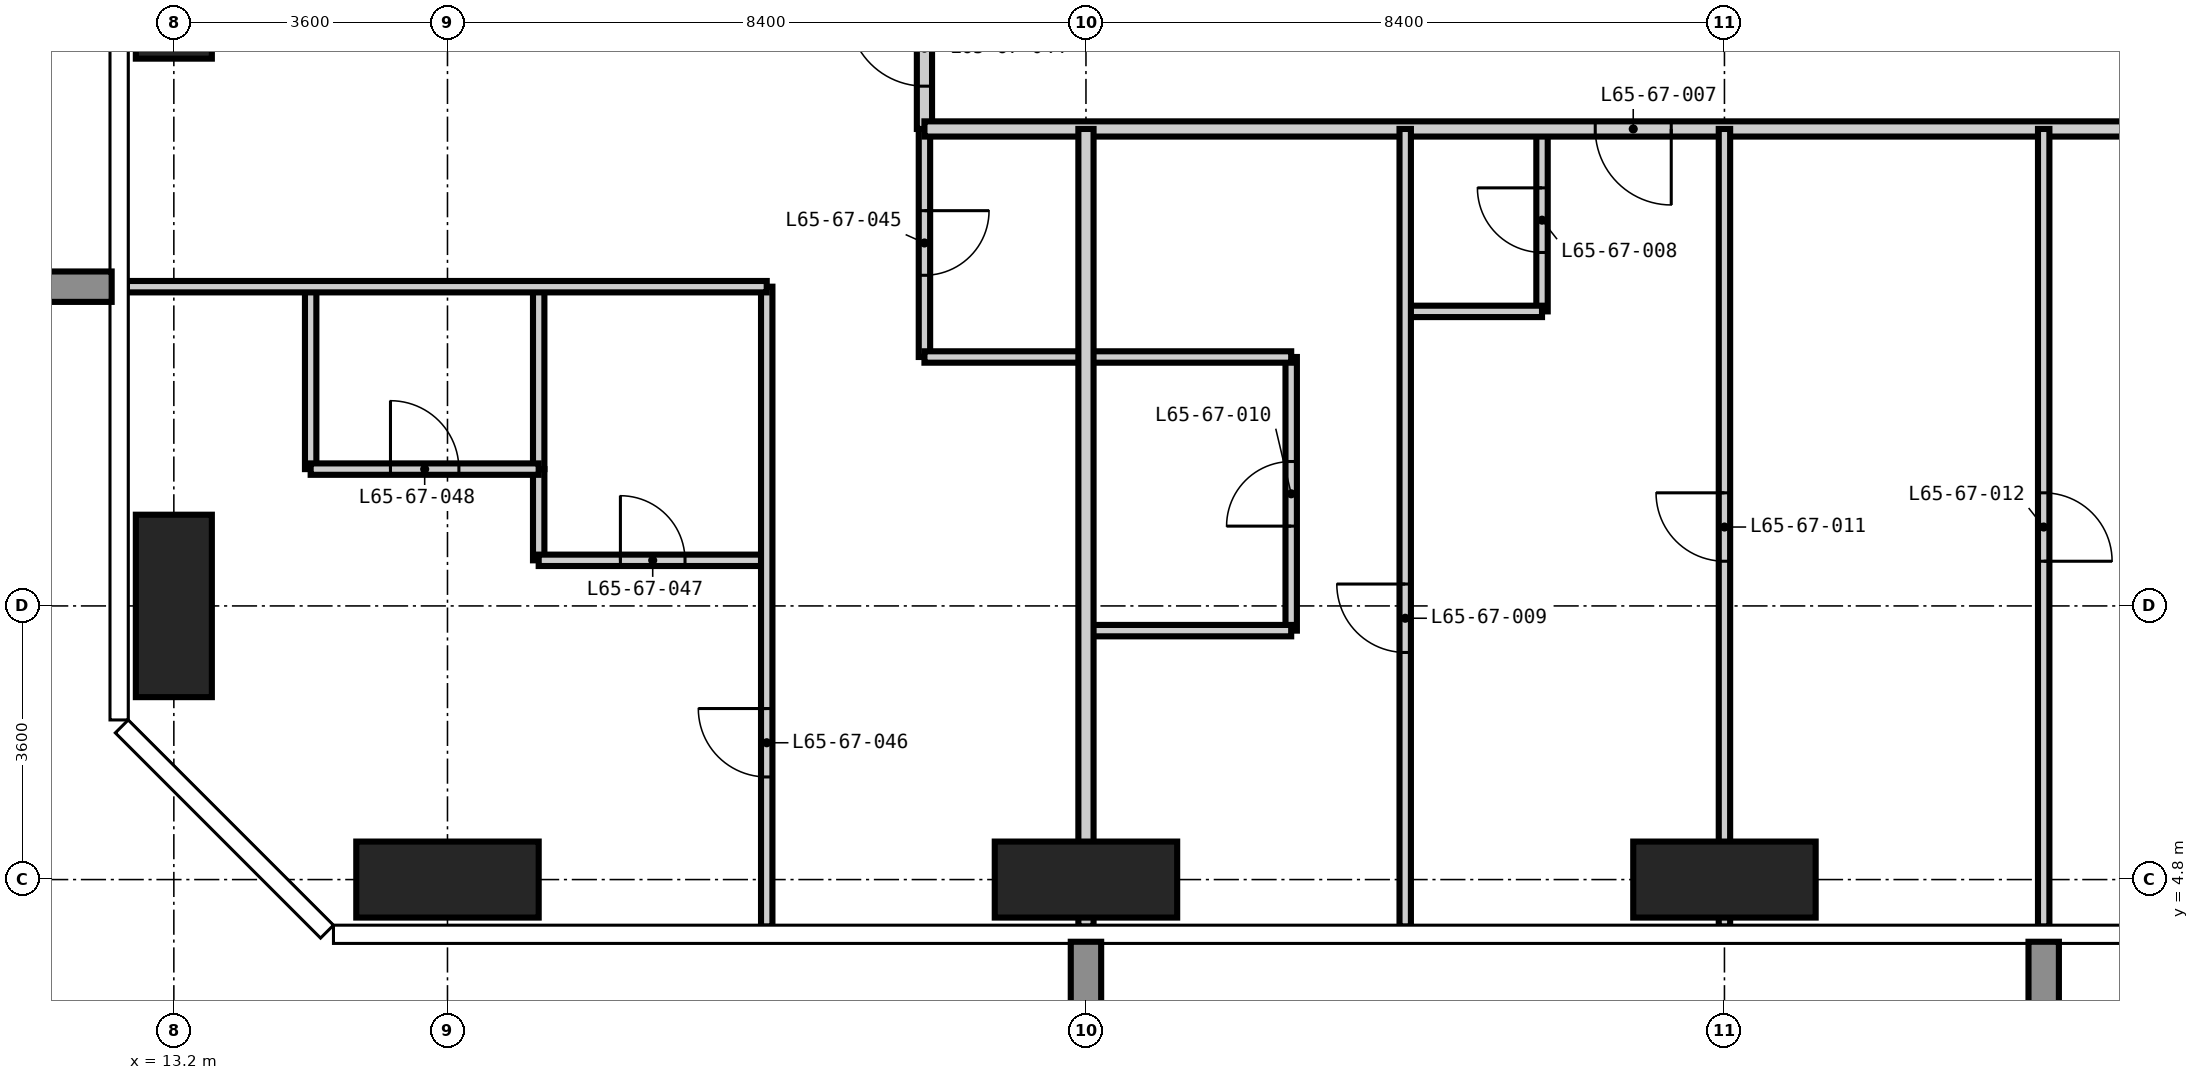
"""IFC4 building model, lengths in metres.
Left out: names, types, materials, properties, quantities, classifications, styles, units other than length and angle.
Written with IfcOpenShell. Run it as: python <this file> out.ifc"""

import sys

from ifc_helpers import new_model, si_unit, direction, frame, frame_2d, origin, origin_2d, place, context, subcontext, project, spatial, rectangle, extrude, element, fill, save


model = new_model("IFC4")
c1 = context("Model", 3, precision=1e-05, world=origin(), true_north=direction((0.0, 1.0)))
c2 = subcontext(c1, "Body", "Model", "MODEL_VIEW")
j1 = project(units=[si_unit("LENGTHUNIT", "METRE"), si_unit("PLANEANGLEUNIT", "RADIAN")], contexts=[c1])
p1 = place(None, origin())
s1 = spatial("IfcSite", under=j1, at=p1, CompositionType="ELEMENT")
p2 = place(p1, origin())
s2 = spatial("IfcBuilding", under=s1, at=p2, CompositionType="ELEMENT")
p3 = place(p2, frame((0.0, 0.0, 252.9)))
s3 = spatial("IfcBuildingStorey", under=s2, at=p3, CompositionType="ELEMENT", Elevation=252.9)
for number, where, z_axis, x_axis in (
    (1, (13.2, 8.4, -0.35), (0.0, 0.0, 1.0), (1.0, 0.0, 0.0)),
    (2, (13.2, 16.8, -0.35), (0.0, 0.0, 1.0), (1.0, 0.0, 0.0)),
):
    element("IfcColumn", number, at=place(p3, frame(where, z_axis=z_axis, x_axis=x_axis)), inside=s3, PredefinedType="COLUMN", context=c2, shape_type="SweptSolid", body=[
        extrude(rectangle(XDim=1.0, YDim=2.4, at=origin_2d()), origin(), (0.0, 0.0, 1.0), 3.9),
    ])
for number, where, z_axis, x_axis in (
    (3, (16.8, 4.8, -0.35), (0.0, 0.0, 1.0), (1.0, 0.0, 0.0)),
    (4, (25.2, 4.8, -0.35), (0.0, 0.0, 1.0), (1.0, 0.0, 0.0)),
    (5, (33.6, 4.8, -0.35), (0.0, 0.0, 1.0), (1.0, 0.0, 0.0)),
):
    element("IfcColumn", number, at=place(p3, frame(where, z_axis=z_axis, x_axis=x_axis)), inside=s3, PredefinedType="COLUMN", context=c2, shape_type="SweptSolid", body=[
        extrude(rectangle(XDim=2.4, YDim=1.0, at=origin_2d()), origin(), (0.0, 0.0, 1.0), 3.9),
    ])
p4 = place(p3, frame((18.0, 9.0, 0.0), z_axis=(0.0, 0.0, 1.0), x_axis=(0.0, 1.0, 0.0)))
e6 = element("IfcWall", 6, at=p4, inside=s3, PredefinedType="PARTITIONING", context=c2, shape_type="SweptSolid", body=[
    extrude(rectangle(XDim=1.2, YDim=0.15, at=frame_2d((0.6, 0.0))), origin(), (0.0, 0.0, 1.0), 3.55),
])
p5 = place(p3, frame((23.075, 11.675, 0.0), z_axis=(0.0, 0.0, 1.0), x_axis=(0.0, 1.0, 0.0)))
e7 = element("IfcWall", 7, at=p5, inside=s3, PredefinedType="PARTITIONING", context=c2, shape_type="SweptSolid", body=[
    extrude(rectangle(XDim=3.0, YDim=0.15, at=frame_2d((1.5, 0.0))), origin(), (0.0, 0.0, 1.0), 3.55),
])
p6 = place(p5, frame((1.075, 0.0, 0.0)))
e8 = element("IfcOpeningElement", 8, at=p6, cuts=e7, PredefinedType="OPENING", context=c2, shape_type="SweptSolid", body=[
    extrude(rectangle(XDim=0.85, YDim=2.1, at=frame_2d((0.425, 1.05))), frame((0.0, 0.085, 0.0), z_axis=(0.0, -1.0, 0.0), x_axis=(1.0, 0.0, 0.0)), (0.0, 0.0, 1.0), 0.17),
])
p7 = place(p3, frame((27.9, 8.075, 0.0), z_axis=(0.0, 0.0, 1.0), x_axis=(0.0, 1.0, 0.0)))
e9 = element("IfcWall", 9, at=p7, inside=s3, PredefinedType="PARTITIONING", context=c2, shape_type="SweptSolid", body=[
    extrude(rectangle(XDim=3.6, YDim=0.15, at=frame_2d((1.8, 0.0))), origin(), (0.0, 0.0, 1.0), 3.55),
])
p8 = place(p7, frame((1.375, 0.0, 0.0)))
e10 = element("IfcOpeningElement", 10, at=p8, cuts=e9, PredefinedType="OPENING", context=c2, shape_type="SweptSolid", body=[
    extrude(rectangle(XDim=0.85, YDim=2.1, at=frame_2d((0.425, 1.05))), frame((0.0, 0.085, 0.0), z_axis=(0.0, -1.0, 0.0), x_axis=(1.0, 0.0, 0.0)), (0.0, 0.0, 1.0), 0.17),
])
p9 = place(p3, frame((31.2, 12.275, 0.0), z_axis=(0.0, 0.0, 1.0), x_axis=(0.0, 1.0, 0.0)))
e11 = element("IfcWall", 11, at=p9, inside=s3, PredefinedType="PARTITIONING", context=c2, shape_type="SweptSolid", body=[
    extrude(rectangle(XDim=2.4, YDim=0.15, at=frame_2d((1.2, 0.0))), origin(), (0.0, 0.0, 1.0), 3.55),
])
p10 = place(p9, frame((0.775, 0.0, 0.0)))
e12 = element("IfcOpeningElement", 12, at=p10, cuts=e11, PredefinedType="OPENING", context=c2, shape_type="SweptSolid", body=[
    extrude(rectangle(XDim=0.85, YDim=2.1, at=frame_2d((0.425, 1.05))), frame((0.0, 0.085, 0.0), z_axis=(0.0, -1.0, 0.0), x_axis=(1.0, 0.0, 0.0)), (0.0, 0.0, 1.0), 0.17),
])
p11 = place(p3, frame((25.2, 8.075, 0.0), z_axis=(0.0, 0.0, 1.0), x_axis=(1.0, 0.0, 0.0)))
e13 = element("IfcWall", 13, at=p11, inside=s3, PredefinedType="PARTITIONING", context=c2, shape_type="SweptSolid", body=[
    extrude(rectangle(XDim=2.7, YDim=0.15, at=frame_2d((1.35, 0.0))), origin(), (0.0, 0.0, 1.0), 3.55),
])
p12 = place(p3, frame((18.0, 9.0, 0.0), z_axis=(0.0, 0.0, 1.0), x_axis=(1.0, 0.0, 0.0)))
e14 = element("IfcWall", 14, at=p12, inside=s3, PredefinedType="PARTITIONING", context=c2, shape_type="SweptSolid", body=[
    extrude(rectangle(XDim=3.0, YDim=0.15, at=frame_2d((1.5, 0.0))), origin(), (0.0, 0.0, 1.0), 3.55),
])
p13 = place(p12, frame((1.075, 0.0, 0.0)))
e15 = element("IfcOpeningElement", 15, at=p13, cuts=e14, PredefinedType="OPENING", context=c2, shape_type="SweptSolid", body=[
    extrude(rectangle(XDim=0.85, YDim=2.1, at=frame_2d((0.425, 1.05))), frame((0.0, 0.085, 0.0), z_axis=(0.0, -1.0, 0.0), x_axis=(1.0, 0.0, 0.0)), (0.0, 0.0, 1.0), 0.17),
])
p14 = place(p3, frame((23.075, 11.675, 0.0), z_axis=(0.0, 0.0, 1.0), x_axis=(1.0, 0.0, 0.0)))
e16 = element("IfcWall", 16, at=p14, inside=s3, PredefinedType="PARTITIONING", context=c2, shape_type="SweptSolid", body=[
    extrude(rectangle(XDim=4.825, YDim=0.15, at=frame_2d((2.413, 0.0))), origin(), (0.0, 0.0, 1.0), 3.55),
])
p15 = place(p3, frame((29.4, 12.275, 0.0), z_axis=(0.0, 0.0, 1.0), x_axis=(1.0, 0.0, 0.0)))
e17 = element("IfcWall", 17, at=p15, inside=s3, PredefinedType="PARTITIONING", context=c2, shape_type="SweptSolid", body=[
    extrude(rectangle(XDim=1.8, YDim=0.15, at=frame_2d((0.9, 0.0))), origin(), (0.0, 0.0, 1.0), 3.55),
])
p16 = place(p3, frame((23.075, 14.675, 0.0), z_axis=(0.0, 0.0, 1.0), x_axis=(0.0, 1.0, 0.0)))
e18 = element("IfcWall", 18, at=p16, inside=s3, PredefinedType="PARTITIONING", context=c2, shape_type="SweptSolid", body=[
    extrude(rectangle(XDim=30.65, YDim=0.2, at=frame_2d((15.325, 0.0))), origin(), (0.0, 0.0, 1.0), 3.55),
])
p17 = place(p16, frame((4.925, 0.0, 0.0)))
e19 = element("IfcOpeningElement", 19, at=p17, cuts=e18, PredefinedType="OPENING", context=c2, shape_type="SweptSolid", body=[
    extrude(rectangle(XDim=1.0, YDim=2.2, at=frame_2d((0.5, 1.1))), frame((0.0, 0.11, 0.0), z_axis=(0.0, -1.0, 0.0), x_axis=(1.0, 0.0, 0.0)), (0.0, 0.0, 1.0), 0.22),
])
p18 = place(p16, frame((15.125, 0.0, 0.0)))
e20 = element("IfcOpeningElement", 20, at=p18, cuts=e18, PredefinedType="OPENING", context=c2, shape_type="SweptSolid", body=[
    extrude(rectangle(XDim=1.0, YDim=2.2, at=frame_2d((0.5, 1.1))), frame((0.0, 0.11, 0.0), z_axis=(0.0, -1.0, 0.0), x_axis=(1.0, 0.0, 0.0)), (0.0, 0.0, 1.0), 0.22),
])
p19 = place(p16, frame((21.725, 0.0, 0.0)))
e21 = element("IfcOpeningElement", 21, at=p19, cuts=e18, PredefinedType="OPENING", context=c2, shape_type="SweptSolid", body=[
    extrude(rectangle(XDim=1.0, YDim=2.2, at=frame_2d((0.5, 1.1))), frame((0.0, 0.11, 0.0), z_axis=(0.0, -1.0, 0.0), x_axis=(1.0, 0.0, 0.0)), (0.0, 0.0, 1.0), 0.22),
])
p20 = place(p16, frame((0.563, 0.0, 0.0)))
e22 = element("IfcOpeningElement", 22, at=p20, cuts=e18, PredefinedType="OPENING", context=c2, shape_type="SweptSolid", body=[
    extrude(rectangle(XDim=1.0, YDim=2.2, at=frame_2d((0.5, 1.1))), frame((0.0, 0.11, 0.0), z_axis=(0.0, -1.0, 0.0), x_axis=(1.0, 0.0, 0.0)), (0.0, 0.0, 1.0), 0.22),
])
p21 = place(p16, frame((28.488, 0.0, 0.0)))
e23 = element("IfcOpeningElement", 23, at=p21, cuts=e18, PredefinedType="OPENING", context=c2, shape_type="SweptSolid", body=[
    extrude(rectangle(XDim=1.0, YDim=2.2, at=frame_2d((0.5, 1.1))), frame((0.0, 0.11, 0.0), z_axis=(0.0, -1.0, 0.0), x_axis=(1.0, 0.0, 0.0)), (0.0, 0.0, 1.0), 0.22),
])
p22 = place(p3, frame((44.725, 14.675, 0.0), z_axis=(0.0, 0.0, 1.0), x_axis=(-1.0, 0.0, 0.0)))
e24 = element("IfcWall", 24, at=p22, inside=s3, PredefinedType="PARTITIONING", context=c2, shape_type="SweptSolid", body=[
    extrude(rectangle(XDim=21.65, YDim=0.2, at=frame_2d((10.825, 0.0))), origin(), (0.0, 0.0, 1.0), 3.55),
])
p23 = place(p22, frame((11.825, 0.0, 0.0)))
e25 = element("IfcOpeningElement", 25, at=p23, cuts=e24, PredefinedType="OPENING", context=c2, shape_type="SweptSolid", body=[
    extrude(rectangle(XDim=1.0, YDim=2.2, at=frame_2d((0.5, 1.1))), frame((0.0, 0.11, 0.0), z_axis=(0.0, -1.0, 0.0), x_axis=(1.0, 0.0, 0.0)), (0.0, 0.0, 1.0), 0.22),
])
p24 = place(p3, frame((25.2, 4.182, 0.0), z_axis=(0.0, 0.0, 1.0), x_axis=(0.0, 1.0, 0.0)))
e26 = element("IfcWall", 26, at=p24, inside=s3, PredefinedType="PARTITIONING", context=c2, shape_type="SweptSolid", body=[
    extrude(rectangle(XDim=10.493, YDim=0.2, at=frame_2d((5.247, 0.0))), origin(), (0.0, 0.0, 1.0), 3.55),
])
for number, where, z_axis, x_axis in (
    (27, (15.0, 10.2, 0.0), (0.0, 0.0, 1.0), (0.0, 1.0, 0.0)),
    (28, (18.0, 10.2, 0.0), (0.0, 0.0, 1.0), (0.0, 1.0, 0.0)),
):
    element("IfcWall", number, at=place(p3, frame(where, z_axis=z_axis, x_axis=x_axis)), inside=s3, PredefinedType="PARTITIONING", context=c2, shape_type="SweptSolid", body=[
        extrude(rectangle(XDim=2.4, YDim=0.15, at=frame_2d((1.2, 0.0))), origin(), (0.0, 0.0, 1.0), 3.55),
    ])
p25 = place(p3, frame((21.0, 4.182, 0.0), z_axis=(0.0, 0.0, 1.0), x_axis=(0.0, 1.0, 0.0)))
e29 = element("IfcWall", 29, at=p25, inside=s3, PredefinedType="PARTITIONING", context=c2, shape_type="SweptSolid", body=[
    extrude(rectangle(XDim=8.418, YDim=0.15, at=frame_2d((4.209, 0.0))), origin(), (0.0, 0.0, 1.0), 3.55),
])
p26 = place(p25, frame((1.968, 0.0, 0.0)))
e30 = element("IfcOpeningElement", 30, at=p26, cuts=e29, PredefinedType="OPENING", context=c2, shape_type="SweptSolid", body=[
    extrude(rectangle(XDim=0.9, YDim=2.1, at=frame_2d((0.45, 1.05))), frame((0.0, 0.085, 0.0), z_axis=(0.0, -1.0, 0.0), x_axis=(1.0, 0.0, 0.0)), (0.0, 0.0, 1.0), 0.17),
])
p27 = place(p3, frame((29.4, 4.182, 0.0), z_axis=(0.0, 0.0, 1.0), x_axis=(0.0, 1.0, 0.0)))
e31 = element("IfcWall", 31, at=p27, inside=s3, PredefinedType="PARTITIONING", context=c2, shape_type="SweptSolid", body=[
    extrude(rectangle(XDim=10.493, YDim=0.15, at=frame_2d((5.247, 0.0))), origin(), (0.0, 0.0, 1.0), 3.55),
])
p28 = place(p27, frame((3.606, 0.0, 0.0)))
e32 = element("IfcOpeningElement", 32, at=p28, cuts=e31, PredefinedType="OPENING", context=c2, shape_type="SweptSolid", body=[
    extrude(rectangle(XDim=0.9, YDim=2.1, at=frame_2d((0.45, 1.05))), frame((0.0, 0.085, 0.0), z_axis=(0.0, -1.0, 0.0), x_axis=(1.0, 0.0, 0.0)), (0.0, 0.0, 1.0), 0.17),
])
p29 = place(p3, frame((33.6, 4.182, 0.0), z_axis=(0.0, 0.0, 1.0), x_axis=(0.0, 1.0, 0.0)))
e33 = element("IfcWall", 33, at=p29, inside=s3, PredefinedType="PARTITIONING", context=c2, shape_type="SweptSolid", body=[
    extrude(rectangle(XDim=10.493, YDim=0.15, at=frame_2d((5.247, 0.0))), origin(), (0.0, 0.0, 1.0), 3.55),
])
p30 = place(p29, frame((4.806, 0.0, 0.0)))
e34 = element("IfcOpeningElement", 34, at=p30, cuts=e33, PredefinedType="OPENING", context=c2, shape_type="SweptSolid", body=[
    extrude(rectangle(XDim=0.9, YDim=2.1, at=frame_2d((0.45, 1.05))), frame((0.0, 0.085, 0.0), z_axis=(0.0, -1.0, 0.0), x_axis=(1.0, 0.0, 0.0)), (0.0, 0.0, 1.0), 0.17),
])
p31 = place(p3, frame((37.8, 4.182, 0.0), z_axis=(0.0, 0.0, 1.0), x_axis=(0.0, 1.0, 0.0)))
e35 = element("IfcWall", 35, at=p31, inside=s3, PredefinedType="PARTITIONING", context=c2, shape_type="SweptSolid", body=[
    extrude(rectangle(XDim=10.493, YDim=0.15, at=frame_2d((5.247, 0.0))), origin(), (0.0, 0.0, 1.0), 3.55),
])
p32 = place(p31, frame((4.806, 0.0, 0.0)))
e36 = element("IfcOpeningElement", 36, at=p32, cuts=e35, PredefinedType="OPENING", context=c2, shape_type="SweptSolid", body=[
    extrude(rectangle(XDim=0.9, YDim=2.1, at=frame_2d((0.45, 1.05))), frame((0.0, 0.085, 0.0), z_axis=(0.0, -1.0, 0.0), x_axis=(1.0, 0.0, 0.0)), (0.0, 0.0, 1.0), 0.17),
])
p33 = place(p3, frame((15.0, 10.2, 0.0), z_axis=(0.0, 0.0, 1.0), x_axis=(1.0, 0.0, 0.0)))
e37 = element("IfcWall", 37, at=p33, inside=s3, PredefinedType="PARTITIONING", context=c2, shape_type="SweptSolid", body=[
    extrude(rectangle(XDim=3.0, YDim=0.15, at=frame_2d((1.5, 0.0))), origin(), (0.0, 0.0, 1.0), 3.55),
])
p34 = place(p33, frame((1.05, 0.0, 0.0)))
e38 = element("IfcOpeningElement", 38, at=p34, cuts=e37, PredefinedType="OPENING", context=c2, shape_type="SweptSolid", body=[
    extrude(rectangle(XDim=0.9, YDim=2.1, at=frame_2d((0.45, 1.05))), frame((0.0, 0.085, 0.0), z_axis=(0.0, -1.0, 0.0), x_axis=(1.0, 0.0, 0.0)), (0.0, 0.0, 1.0), 0.17),
])
p35 = place(p3, frame((12.582, 12.6, 0.0), z_axis=(0.0, 0.0, 1.0), x_axis=(1.0, 0.0, 0.0)))
e39 = element("IfcWall", 39, at=p35, inside=s3, PredefinedType="PARTITIONING", context=c2, shape_type="SweptSolid", body=[
    extrude(rectangle(XDim=8.418, YDim=0.15, at=frame_2d((4.209, 0.0))), origin(), (0.0, 0.0, 1.0), 3.55),
])
p36 = place(p23, origin())
e40 = element("IfcDoor", 40, at=p36, inside=s3, OperationType="SINGLE_SWING_LEFT", PredefinedType="DOOR", context=c2, shape_type="SweptSolid", body=[
    extrude(rectangle(XDim=1.0, YDim=2.2, at=frame_2d((0.5, 1.1))), frame((0.0, 0.025, 0.0), z_axis=(0.0, -1.0, 0.0), x_axis=(1.0, 0.0, 0.0)), (0.0, 0.0, 1.0), 0.05),
])
fill(e25, e40)
p37 = place(p10, origin())
e41 = element("IfcDoor", 41, at=p37, inside=s3, OperationType="SINGLE_SWING_RIGHT", PredefinedType="DOOR", context=c2, shape_type="SweptSolid", body=[
    extrude(rectangle(XDim=0.85, YDim=2.1, at=frame_2d((0.425, 1.05))), frame((0.0, 0.025, 0.0), z_axis=(0.0, -1.0, 0.0), x_axis=(1.0, 0.0, 0.0)), (0.0, 0.0, 1.0), 0.05),
])
fill(e12, e41)
p38 = place(p28, origin())
e42 = element("IfcDoor", 42, at=p38, inside=s3, OperationType="SINGLE_SWING_RIGHT", PredefinedType="DOOR", context=c2, shape_type="SweptSolid", body=[
    extrude(rectangle(XDim=0.9, YDim=2.1, at=frame_2d((0.45, 1.05))), frame((0.0, 0.025, 0.0), z_axis=(0.0, -1.0, 0.0), x_axis=(1.0, 0.0, 0.0)), (0.0, 0.0, 1.0), 0.05),
])
fill(e32, e42)
p39 = place(p8, origin())
e43 = element("IfcDoor", 43, at=p39, inside=s3, OperationType="SINGLE_SWING_LEFT", PredefinedType="DOOR", context=c2, shape_type="SweptSolid", body=[
    extrude(rectangle(XDim=0.85, YDim=2.1, at=frame_2d((0.425, 1.05))), frame((0.0, 0.025, 0.0), z_axis=(0.0, -1.0, 0.0), x_axis=(1.0, 0.0, 0.0)), (0.0, 0.0, 1.0), 0.05),
])
fill(e10, e43)
p40 = place(p30, origin())
e44 = element("IfcDoor", 44, at=p40, inside=s3, OperationType="SINGLE_SWING_RIGHT", PredefinedType="DOOR", context=c2, shape_type="SweptSolid", body=[
    extrude(rectangle(XDim=0.9, YDim=2.1, at=frame_2d((0.45, 1.05))), frame((0.0, 0.025, 0.0), z_axis=(0.0, -1.0, 0.0), x_axis=(1.0, 0.0, 0.0)), (0.0, 0.0, 1.0), 0.05),
])
fill(e34, e44)
p41 = place(p32, frame((0.9, 0.0, 0.0), z_axis=(0.0, 0.0, 1.0), x_axis=(-1.0, 0.0, 0.0)))
e45 = element("IfcDoor", 45, at=p41, inside=s3, OperationType="SINGLE_SWING_RIGHT", PredefinedType="DOOR", context=c2, shape_type="SweptSolid", body=[
    extrude(rectangle(XDim=0.9, YDim=2.1, at=frame_2d((0.45, 1.05))), frame((0.0, 0.025, 0.0), z_axis=(0.0, -1.0, 0.0), x_axis=(1.0, 0.0, 0.0)), (0.0, 0.0, 1.0), 0.05),
])
fill(e36, e45)
p42 = place(p20, origin())
e46 = element("IfcDoor", 46, at=p42, inside=s3, OperationType="SINGLE_SWING_RIGHT", PredefinedType="DOOR", context=c2, shape_type="SweptSolid", body=[
    extrude(rectangle(XDim=1.0, YDim=2.2, at=frame_2d((0.5, 1.1))), frame((0.0, 0.025, 0.0), z_axis=(0.0, -1.0, 0.0), x_axis=(1.0, 0.0, 0.0)), (0.0, 0.0, 1.0), 0.05),
])
fill(e22, e46)
p43 = place(p6, frame((0.85, 0.0, 0.0), z_axis=(0.0, 0.0, 1.0), x_axis=(-1.0, 0.0, 0.0)))
e47 = element("IfcDoor", 47, at=p43, inside=s3, OperationType="SINGLE_SWING_LEFT", PredefinedType="DOOR", context=c2, shape_type="SweptSolid", body=[
    extrude(rectangle(XDim=0.85, YDim=2.1, at=frame_2d((0.425, 1.05))), frame((0.0, 0.025, 0.0), z_axis=(0.0, -1.0, 0.0), x_axis=(1.0, 0.0, 0.0)), (0.0, 0.0, 1.0), 0.05),
])
fill(e8, e47)
p44 = place(p26, origin())
e48 = element("IfcDoor", 48, at=p44, inside=s3, OperationType="SINGLE_SWING_RIGHT", PredefinedType="DOOR", context=c2, shape_type="SweptSolid", body=[
    extrude(rectangle(XDim=0.9, YDim=2.1, at=frame_2d((0.45, 1.05))), frame((0.0, 0.025, 0.0), z_axis=(0.0, -1.0, 0.0), x_axis=(1.0, 0.0, 0.0)), (0.0, 0.0, 1.0), 0.05),
])
fill(e30, e48)
p45 = place(p13, origin())
e49 = element("IfcDoor", 49, at=p45, inside=s3, OperationType="SINGLE_SWING_LEFT", PredefinedType="DOOR", context=c2, shape_type="SweptSolid", body=[
    extrude(rectangle(XDim=0.85, YDim=2.1, at=frame_2d((0.425, 1.05))), frame((0.0, 0.025, 0.0), z_axis=(0.0, -1.0, 0.0), x_axis=(1.0, 0.0, 0.0)), (0.0, 0.0, 1.0), 0.05),
])
fill(e15, e49)
p46 = place(p34, origin())
e50 = element("IfcDoor", 50, at=p46, inside=s3, OperationType="SINGLE_SWING_LEFT", PredefinedType="DOOR", context=c2, shape_type="SweptSolid", body=[
    extrude(rectangle(XDim=0.9, YDim=2.1, at=frame_2d((0.45, 1.05))), frame((0.0, 0.025, 0.0), z_axis=(0.0, -1.0, 0.0), x_axis=(1.0, 0.0, 0.0)), (0.0, 0.0, 1.0), 0.05),
])
fill(e38, e50)
save(model, sys.argv[1])
